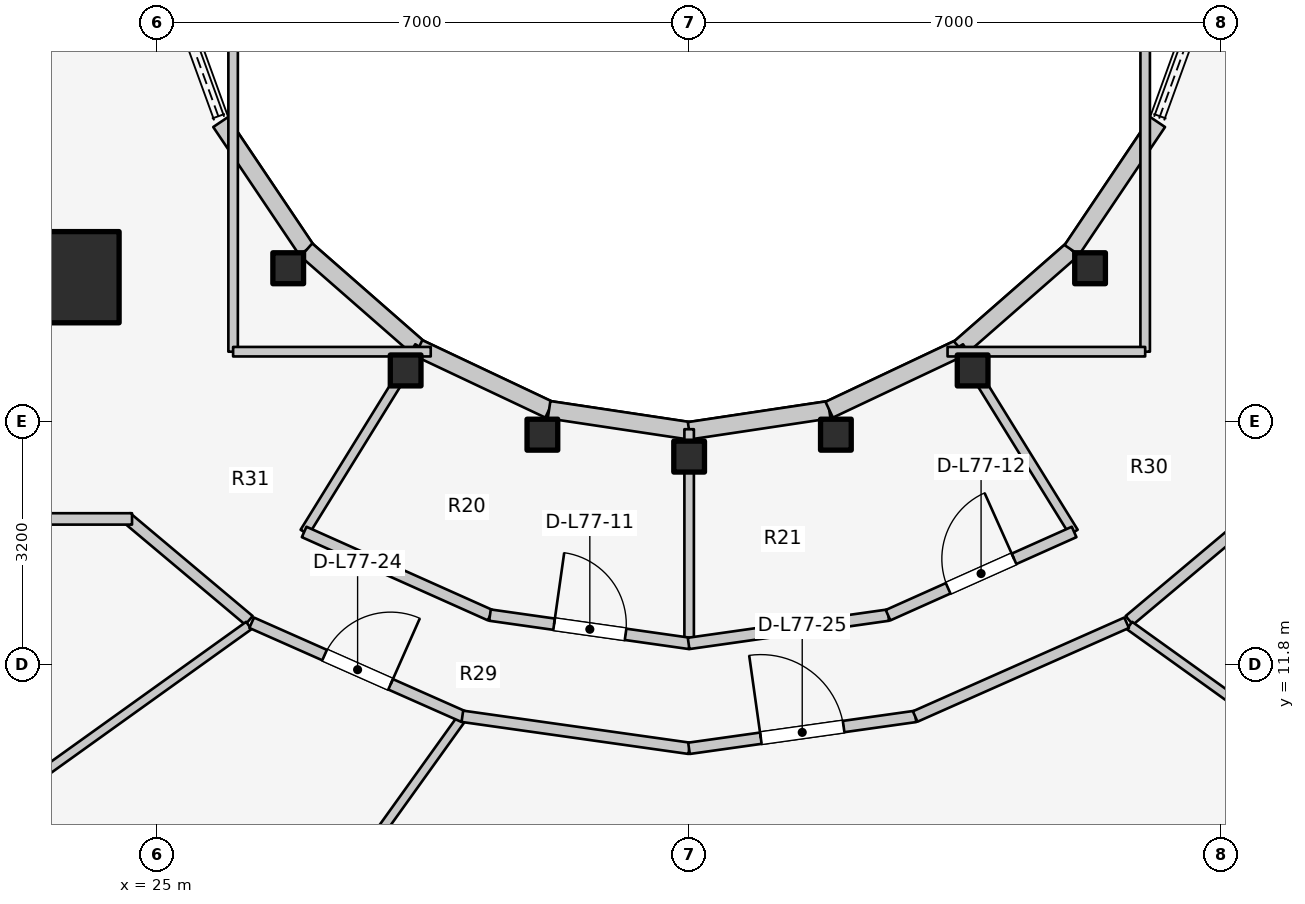
"""IFC4 building model, lengths in metres.
Left out: names, types, materials, properties, quantities, classifications, styles, units other than length and angle.
Written with IfcOpenShell. Run it as: python <this file> out.ifc"""

import sys

from ifc_helpers import new_model, si_unit, direction, frame, frame_2d, origin, origin_2d, place, context, subcontext, project, spatial, rectangle, i_section, extrude, element, fill, save


model = new_model("IFC4")
c1 = context("Model", 3, precision=1e-05, world=origin(), true_north=direction((0.0, 1.0)))
c2 = subcontext(c1, "Body", "Model", "MODEL_VIEW")
j1 = project(units=[si_unit("LENGTHUNIT", "METRE"), si_unit("PLANEANGLEUNIT", "RADIAN")], contexts=[c1])
p1 = place(None, origin())
s1 = spatial("IfcSite", under=j1, at=p1, CompositionType="ELEMENT")
p2 = place(p1, origin())
s2 = spatial("IfcBuilding", under=s1, at=p2, CompositionType="ELEMENT")
p3 = place(p2, frame((0.0, 0.0, 253.2)))
s3 = spatial("IfcBuildingStorey", under=s2, at=p3, CompositionType="ELEMENT", Elevation=253.2)
p4 = place(p3, frame((19.65, 16.55, 0.0), z_axis=(0.0, 0.0, 1.0), x_axis=(1.0, 0.0, 0.0)))
e1 = element("IfcWall", 1, at=p4, inside=s3, PredefinedType="SHEAR", context=c2, shape_type="SweptSolid", body=[
    extrude(rectangle(XDim=4.5, YDim=0.45, at=frame_2d((2.25, 0.0))), origin(), (0.0, 0.0, 1.0), 3.6),
])
p5 = place(p3, frame((23.9, 16.9, 0.0), z_axis=(0.0, 0.0, 1.0), x_axis=(1.0, 0.0, 0.0)))
e2 = element("IfcColumn", 2, at=p5, inside=s3, PredefinedType="COLUMN", context=c2, shape_type="SweptSolid", body=[
    extrude(rectangle(XDim=1.2, YDim=1.2, at=origin_2d()), origin(), (0.0, 0.0, 1.0), 3.6),
])
for number, where, z_axis, x_axis in (
    (3, (26.725, 17.018, 0.0), (0.0, 0.0, 1.0), (1.0, 0.0, 0.0)),
    (4, (28.27, 15.673, 0.0), (0.0, 0.0, 1.0), (1.0, 0.0, 0.0)),
    (5, (30.069, 14.828, 0.0), (0.0, 0.0, 1.0), (1.0, 0.0, 0.0)),
    (6, (32.0, 14.54, 0.0), (0.0, 0.0, 1.0), (1.0, 0.0, 0.0)),
    (7, (33.931, 14.828, 0.0), (0.0, 0.0, 1.0), (1.0, 0.0, 0.0)),
    (8, (35.73, 15.673, 0.0), (0.0, 0.0, 1.0), (1.0, 0.0, 0.0)),
    (9, (37.275, 17.018, 0.0), (0.0, 0.0, 1.0), (1.0, 0.0, 0.0)),
):
    element("IfcColumn", number, at=place(p3, frame(where, z_axis=z_axis, x_axis=x_axis)), inside=s3, PredefinedType="COLUMN", context=c2, shape_type="SweptSolid", body=[
        extrude(i_section(OverallWidth=0.404, OverallDepth=0.407, WebThickness=0.027, FlangeThickness=0.044, FilletRadius=0.025, at=origin_2d()), origin(), (0.0, 0.0, 1.0), 3.6),
    ])
p6 = place(p3, frame((25.834, 18.94, 0.0), z_axis=(0.0, 0.0, 1.0), x_axis=(0.558197800898, -0.829707909492, 0.0)))
e10 = element("IfcWall", 10, at=p6, inside=s3, PredefinedType="STANDARD", context=c2, shape_type="SweptSolid", body=[
    extrude(rectangle(XDim=2.027, YDim=0.23, at=frame_2d((1.013, 0.0))), origin(), (0.0, 0.0, 1.0), 2.6),
])
p7 = place(p3, frame((26.965, 17.258, 0.0), z_axis=(0.0, 0.0, 1.0), x_axis=(0.752576694707, -0.658504607869, 0.0)))
e11 = element("IfcWall", 11, at=p7, inside=s3, PredefinedType="STANDARD", context=c2, shape_type="SweptSolid", body=[
    extrude(rectangle(XDim=1.959, YDim=0.23, at=frame_2d((0.98, 0.0))), origin(), (0.0, 0.0, 1.0), 2.6),
])
p8 = place(p3, frame((28.44, 15.968, 0.0), z_axis=(0.0, 0.0, 1.0), x_axis=(0.904179699603, -0.427152280606, 0.0)))
e12 = element("IfcWall", 12, at=p8, inside=s3, PredefinedType="STANDARD", context=c2, shape_type="SweptSolid", body=[
    extrude(rectangle(XDim=1.899, YDim=0.23, at=frame_2d((0.95, 0.0))), origin(), (0.0, 0.0, 1.0), 2.6),
])
for number, where, z_axis, x_axis in (
    (13, (30.157, 15.157, 0.0), (0.0, 0.0, 1.0), (0.989, -0.149, 0.0)),
    (14, (32.0, 14.88, 0.0), (0.0, 0.0, 1.0), (0.989, 0.149, 0.0)),
):
    element("IfcWall", number, at=place(p3, frame(where, z_axis=z_axis, x_axis=x_axis)), inside=s3, PredefinedType="STANDARD", context=c2, shape_type="SweptSolid", body=[
        extrude(rectangle(XDim=1.864, YDim=0.23, at=frame_2d((0.932, 0.0))), origin(), (0.0, 0.0, 1.0), 2.6),
    ])
p9 = place(p3, frame((33.843, 15.157, 0.0), z_axis=(0.0, 0.0, 1.0), x_axis=(0.904179699603, 0.427152280606, 0.0)))
e15 = element("IfcWall", 15, at=p9, inside=s3, PredefinedType="STANDARD", context=c2, shape_type="SweptSolid", body=[
    extrude(rectangle(XDim=1.899, YDim=0.23, at=frame_2d((0.95, 0.0))), origin(), (0.0, 0.0, 1.0), 2.6),
])
p10 = place(p3, frame((35.56, 15.968, 0.0), z_axis=(0.0, 0.0, 1.0), x_axis=(0.752576694707, 0.658504607869, 0.0)))
e16 = element("IfcWall", 16, at=p10, inside=s3, PredefinedType="STANDARD", context=c2, shape_type="SweptSolid", body=[
    extrude(rectangle(XDim=1.959, YDim=0.23, at=frame_2d((0.98, 0.0))), origin(), (0.0, 0.0, 1.0), 2.6),
])
p11 = place(p3, frame((37.035, 17.258, 0.0), z_axis=(0.0, 0.0, 1.0), x_axis=(0.558197800898, 0.829707909492, 0.0)))
e17 = element("IfcWall", 17, at=p11, inside=s3, PredefinedType="STANDARD", context=c2, shape_type="SweptSolid", body=[
    extrude(rectangle(XDim=2.027, YDim=0.23, at=frame_2d((1.013, 0.0))), origin(), (0.0, 0.0, 1.0), 2.6),
])
p12 = place(p3, frame((28.45, 15.985, 0.0), z_axis=(0.0, 0.0, 1.0), x_axis=(-0.52592395012, -0.850531597702, 0.0)))
e18 = element("IfcWall", 18, at=p12, inside=s3, PredefinedType="PARTITIONING", context=c2, shape_type="SweptSolid", body=[
    extrude(rectangle(XDim=2.869, YDim=0.125, at=frame_2d((1.435, 0.0))), origin(), (0.0, 0.0, 1.0), 2.672),
])
p13 = place(p3, frame((32.0, 14.9, 0.0), z_axis=(0.0, 0.0, 1.0), x_axis=(0.0, -1.0, 0.0)))
e19 = element("IfcWall", 19, at=p13, inside=s3, PredefinedType="PARTITIONING", context=c2, shape_type="SweptSolid", body=[
    extrude(rectangle(XDim=2.818, YDim=0.125, at=frame_2d((1.409, 0.0))), origin(), (0.0, 0.0, 1.0), 2.672),
])
p14 = place(p3, frame((35.55, 15.985, 0.0), z_axis=(0.0, 0.0, 1.0), x_axis=(0.52592395012, -0.850531597702, 0.0)))
e20 = element("IfcWall", 20, at=p14, inside=s3, PredefinedType="PARTITIONING", context=c2, shape_type="SweptSolid", body=[
    extrude(rectangle(XDim=2.869, YDim=0.125, at=frame_2d((1.435, 0.0))), origin(), (0.0, 0.0, 1.0), 2.672),
])
p15 = place(p3, frame((26.935, 13.549, 0.0), z_axis=(0.0, 0.0, 1.0), x_axis=(0.912859324183, -0.408274239027, 0.0)))
e21 = element("IfcWall", 21, at=p15, inside=s3, PredefinedType="PARTITIONING", context=c2, shape_type="SweptSolid", body=[
    extrude(rectangle(XDim=2.682, YDim=0.15, at=frame_2d((1.341, 0.0))), origin(), (0.0, 0.0, 1.0), 2.816),
])
p16 = place(p3, frame((29.38, 12.455, 0.0), z_axis=(0.0, 0.0, 1.0), x_axis=(0.990096156252, -0.140390887794, 0.0)))
e22 = element("IfcWall", 22, at=p16, inside=s3, PredefinedType="PARTITIONING", context=c2, shape_type="SweptSolid", body=[
    extrude(rectangle(XDim=2.654, YDim=0.15, at=frame_2d((1.327, 0.0))), origin(), (0.0, 0.0, 1.0), 2.816),
])
p17 = place(p16, frame((0.852, 0.0, 0.0)))
e23 = element("IfcOpeningElement", 23, at=p17, cuts=e22, PredefinedType="OPENING", context=c2, shape_type="SweptSolid", body=[
    extrude(rectangle(XDim=0.95, YDim=2.1, at=frame_2d((0.475, 1.05))), frame((0.0, 0.085, 0.0), z_axis=(0.0, -1.0, 0.0), x_axis=(1.0, 0.0, 0.0)), (0.0, 0.0, 1.0), 0.17),
])
p18 = place(p3, frame((31.993, 12.082, 0.0), z_axis=(0.0, 0.0, 1.0), x_axis=(0.990096156252, 0.140390887794, 0.0)))
e24 = element("IfcWall", 24, at=p18, inside=s3, PredefinedType="PARTITIONING", context=c2, shape_type="SweptSolid", body=[
    extrude(rectangle(XDim=2.654, YDim=0.15, at=frame_2d((1.327, 0.0))), origin(), (0.0, 0.0, 1.0), 2.816),
])
p19 = place(p3, frame((34.617, 12.454, 0.0), z_axis=(0.0, 0.0, 1.0), x_axis=(0.912859324183, 0.408274239027, 0.0)))
e25 = element("IfcWall", 25, at=p19, inside=s3, PredefinedType="PARTITIONING", context=c2, shape_type="SweptSolid", body=[
    extrude(rectangle(XDim=2.682, YDim=0.15, at=frame_2d((1.341, 0.0))), origin(), (0.0, 0.0, 1.0), 2.816),
])
p20 = place(p19, frame((0.866, 0.0, 0.0)))
e26 = element("IfcOpeningElement", 26, at=p20, cuts=e25, PredefinedType="OPENING", context=c2, shape_type="SweptSolid", body=[
    extrude(rectangle(XDim=0.95, YDim=2.1, at=frame_2d((0.475, 1.05))), frame((0.0, 0.085, 0.0), z_axis=(0.0, -1.0, 0.0), x_axis=(1.0, 0.0, 0.0)), (0.0, 0.0, 1.0), 0.17),
])
p21 = place(p3, frame((26.0, 15.92, 0.0), z_axis=(0.0, 0.0, 1.0), x_axis=(0.0, 1.0, 0.0)))
e27 = element("IfcWall", 27, at=p21, inside=s3, PredefinedType="PARTITIONING", context=c2, shape_type="SweptSolid", body=[
    extrude(rectangle(XDim=4.28, YDim=0.125, at=frame_2d((2.14, 0.0))), origin(), (0.0, 0.0, 1.0), 2.672),
])
p22 = place(p3, frame((26.0, 15.92, 0.0), z_axis=(0.0, 0.0, 1.0), x_axis=(1.0, 0.0, 0.0)))
e28 = element("IfcWall", 28, at=p22, inside=s3, PredefinedType="PARTITIONING", context=c2, shape_type="SweptSolid", body=[
    extrude(rectangle(XDim=2.6, YDim=0.125, at=frame_2d((1.3, 0.0))), origin(), (0.0, 0.0, 1.0), 2.672),
])
p23 = place(p3, frame((38.0, 15.92, 0.0), z_axis=(0.0, 0.0, 1.0), x_axis=(0.0, 1.0, 0.0)))
e29 = element("IfcWall", 29, at=p23, inside=s3, PredefinedType="PARTITIONING", context=c2, shape_type="SweptSolid", body=[
    extrude(rectangle(XDim=4.28, YDim=0.125, at=frame_2d((2.14, 0.0))), origin(), (0.0, 0.0, 1.0), 2.672),
])
p24 = place(p3, frame((35.4, 15.92, 0.0), z_axis=(0.0, 0.0, 1.0), x_axis=(1.0, 0.0, 0.0)))
e30 = element("IfcWall", 30, at=p24, inside=s3, PredefinedType="PARTITIONING", context=c2, shape_type="SweptSolid", body=[
    extrude(rectangle(XDim=2.6, YDim=0.125, at=frame_2d((1.3, 0.0))), origin(), (0.0, 0.0, 1.0), 2.672),
])
p25 = place(p3, frame((26.209, 12.385, 0.0), z_axis=(0.0, 0.0, 1.0), x_axis=(-0.765677451641, 0.643224719711, 0.0)))
e31 = element("IfcWall", 31, at=p25, inside=s3, PredefinedType="PARTITIONING", context=c2, shape_type="SweptSolid", body=[
    extrude(rectangle(XDim=2.105, YDim=0.15, at=frame_2d((1.053, 0.0))), origin(), (0.0, 0.0, 1.0), 2.816),
])
p26 = place(p3, frame((17.15, 13.72, 0.0), z_axis=(0.0, 0.0, 1.0), x_axis=(1.0, 0.0, 0.0)))
e32 = element("IfcWall", 32, at=p26, inside=s3, PredefinedType="PARTITIONING", context=c2, shape_type="SweptSolid", body=[
    extrude(rectangle(XDim=7.52, YDim=0.15, at=frame_2d((3.76, 0.0))), origin(), (0.0, 0.0, 1.0), 2.816),
])
p27 = place(p26, frame((1.3, 0.0, 0.0)))
e33 = element("IfcOpeningElement", 33, at=p27, cuts=e32, PredefinedType="OPENING", context=c2, shape_type="SweptSolid", body=[
    extrude(rectangle(XDim=0.9, YDim=2.1, at=frame_2d((0.45, 1.05))), frame((0.0, 0.085, 0.0), z_axis=(0.0, -1.0, 0.0), x_axis=(1.0, 0.0, 0.0)), (0.0, 0.0, 1.0), 0.17),
])
p28 = place(p3, frame((37.791, 12.385, 0.0), z_axis=(0.0, 0.0, 1.0), x_axis=(0.765677451641, 0.643224719711, 0.0)))
e34 = element("IfcWall", 34, at=p28, inside=s3, PredefinedType="PARTITIONING", context=c2, shape_type="SweptSolid", body=[
    extrude(rectangle(XDim=2.105, YDim=0.15, at=frame_2d((1.053, 0.0))), origin(), (0.0, 0.0, 1.0), 2.816),
])
p29 = place(p3, frame((26.206, 12.318, 0.0), z_axis=(0.0, 0.0, 1.0), x_axis=(-0.812763742602, -0.582593424879, 0.0)))
e35 = element("IfcWall", 35, at=p29, inside=s3, PredefinedType="MOVABLE", context=c2, shape_type="SweptSolid", body=[
    extrude(rectangle(XDim=6.966, YDim=0.12, at=frame_2d((3.483, 0.0))), origin(), (0.0, 0.0, 1.0), 2.66),
])
p30 = place(p3, frame((28.992, 11.076, 0.0), z_axis=(0.0, 0.0, 1.0), x_axis=(-0.582726066442, -0.812668648029, 0.0)))
e36 = element("IfcWall", 36, at=p30, inside=s3, PredefinedType="MOVABLE", context=c2, shape_type="SweptSolid", body=[
    extrude(rectangle(XDim=6.515, YDim=0.12, at=frame_2d((3.257, 0.0))), origin(), (0.0, 0.0, 1.0), 2.66),
])
p31 = place(p3, frame((37.794, 12.318, 0.0), z_axis=(0.0, 0.0, 1.0), x_axis=(0.812763742602, -0.582593424879, 0.0)))
e37 = element("IfcWall", 37, at=p31, inside=s3, PredefinedType="MOVABLE", context=c2, shape_type="SweptSolid", body=[
    extrude(rectangle(XDim=6.966, YDim=0.12, at=frame_2d((3.483, 0.0))), origin(), (0.0, 0.0, 1.0), 2.66),
])
p32 = place(p3, frame((26.244, 12.354, 0.0), z_axis=(0.0, 0.0, 1.0), x_axis=(0.914302802833, -0.405031337963, 0.0)))
e38 = element("IfcWall", 38, at=p32, inside=s3, PredefinedType="PARTITIONING", context=c2, shape_type="SweptSolid", body=[
    extrude(rectangle(XDim=3.049, YDim=0.15, at=frame_2d((1.525, 0.0))), origin(), (0.0, 0.0, 1.0), 2.816),
])
p33 = place(p32, frame((1.05, 0.0, 0.0)))
e39 = element("IfcOpeningElement", 39, at=p33, cuts=e38, PredefinedType="OPENING", context=c2, shape_type="SweptSolid", body=[
    extrude(rectangle(XDim=0.95, YDim=2.1, at=frame_2d((0.475, 1.05))), frame((0.0, 0.085, 0.0), z_axis=(0.0, -1.0, 0.0), x_axis=(1.0, 0.0, 0.0)), (0.0, 0.0, 1.0), 0.17),
])
p34 = place(p3, frame((29.016, 11.123, 0.0), z_axis=(0.0, 0.0, 1.0), x_axis=(0.990186143936, -0.139754786527, 0.0)))
e40 = element("IfcWall", 40, at=p34, inside=s3, PredefinedType="PARTITIONING", context=c2, shape_type="SweptSolid", body=[
    extrude(rectangle(XDim=3.015, YDim=0.15, at=frame_2d((1.508, 0.0))), origin(), (0.0, 0.0, 1.0), 2.816),
])
p35 = place(p3, frame((31.998, 10.702, 0.0), z_axis=(0.0, 0.0, 1.0), x_axis=(0.990226662921, 0.139467401357, 0.0)))
e41 = element("IfcWall", 41, at=p35, inside=s3, PredefinedType="PARTITIONING", context=c2, shape_type="SweptSolid", body=[
    extrude(rectangle(XDim=3.009, YDim=0.15, at=frame_2d((1.504, 0.0))), origin(), (0.0, 0.0, 1.0), 2.816),
])
p36 = place(p35, frame((0.955, 0.0, 0.0)))
e42 = element("IfcOpeningElement", 42, at=p36, cuts=e41, PredefinedType="OPENING", context=c2, shape_type="SweptSolid", body=[
    extrude(rectangle(XDim=1.1, YDim=2.1, at=frame_2d((0.55, 1.05))), frame((0.0, 0.085, 0.0), z_axis=(0.0, -1.0, 0.0), x_axis=(1.0, 0.0, 0.0)), (0.0, 0.0, 1.0), 0.17),
])
p37 = place(p3, frame((34.974, 11.121, 0.0), z_axis=(0.0, 0.0, 1.0), x_axis=(0.914181699255, 0.405304602425, 0.0)))
e43 = element("IfcWall", 43, at=p37, inside=s3, PredefinedType="PARTITIONING", context=c2, shape_type="SweptSolid", body=[
    extrude(rectangle(XDim=3.043, YDim=0.15, at=frame_2d((1.521, 0.0))), origin(), (0.0, 0.0, 1.0), 2.816),
])
p38 = place(p17, origin())
e44 = element("IfcDoor", 44, at=p38, inside=s3, OperationType="SINGLE_SWING_LEFT", PredefinedType="DOOR", context=c2, shape_type="SweptSolid", body=[
    extrude(rectangle(XDim=0.95, YDim=2.1, at=frame_2d((0.475, 1.05))), frame((0.0, 0.025, 0.0), z_axis=(0.0, -1.0, 0.0), x_axis=(1.0, 0.0, 0.0)), (0.0, 0.0, 1.0), 0.05),
])
fill(e23, e44)
p39 = place(p20, origin())
e45 = element("IfcDoor", 45, at=p39, inside=s3, OperationType="SINGLE_SWING_RIGHT", PredefinedType="DOOR", context=c2, shape_type="SweptSolid", body=[
    extrude(rectangle(XDim=0.95, YDim=2.1, at=frame_2d((0.475, 1.05))), frame((0.0, 0.025, 0.0), z_axis=(0.0, -1.0, 0.0), x_axis=(1.0, 0.0, 0.0)), (0.0, 0.0, 1.0), 0.05),
])
fill(e26, e45)
p40 = place(p33, origin())
e46 = element("IfcDoor", 46, at=p40, inside=s3, OperationType="SINGLE_SWING_RIGHT", PredefinedType="DOOR", context=c2, shape_type="SweptSolid", body=[
    extrude(rectangle(XDim=0.95, YDim=2.1, at=frame_2d((0.475, 1.05))), frame((0.0, 0.025, 0.0), z_axis=(0.0, -1.0, 0.0), x_axis=(1.0, 0.0, 0.0)), (0.0, 0.0, 1.0), 0.05),
])
fill(e39, e46)
p41 = place(p36, origin())
e47 = element("IfcDoor", 47, at=p41, inside=s3, OperationType="SINGLE_SWING_LEFT", PredefinedType="DOOR", context=c2, shape_type="SweptSolid", body=[
    extrude(rectangle(XDim=1.1, YDim=2.1, at=frame_2d((0.55, 1.05))), frame((0.0, 0.025, 0.0), z_axis=(0.0, -1.0, 0.0), x_axis=(1.0, 0.0, 0.0)), (0.0, 0.0, 1.0), 0.05),
])
fill(e42, e47)
save(model, sys.argv[1])
